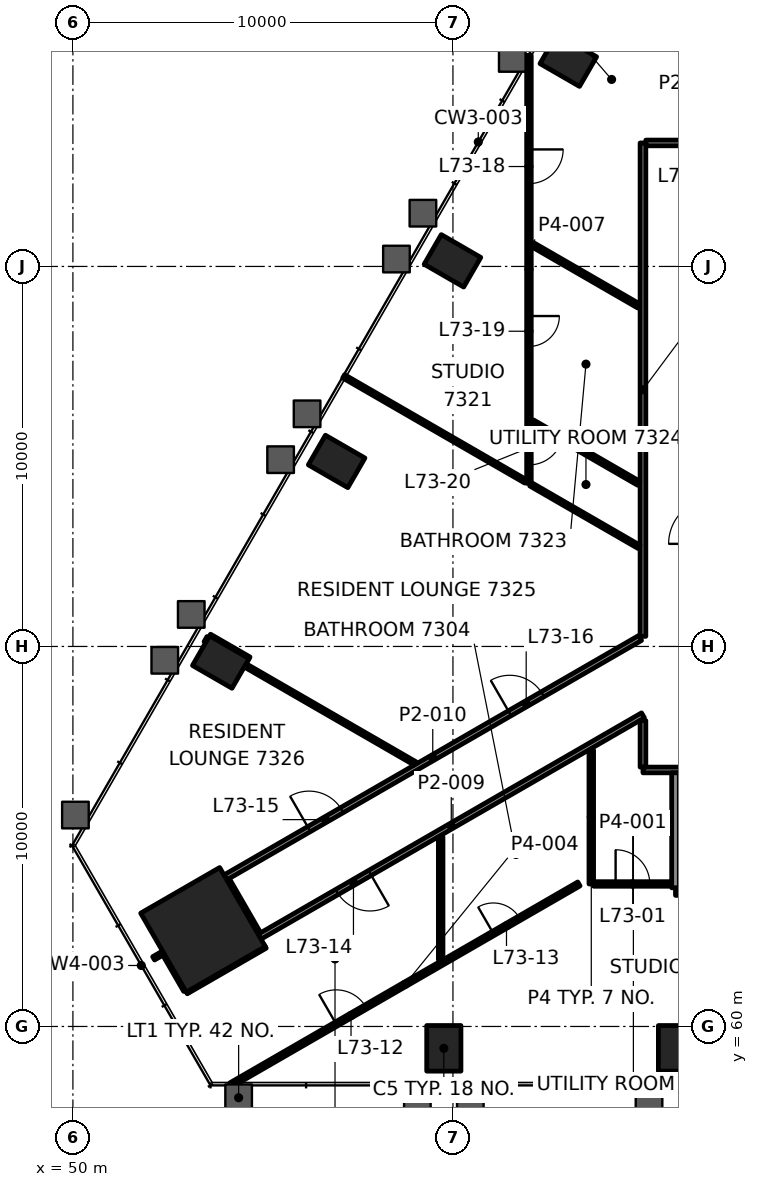
"""IFC4 building model, lengths in metres.
Left out: names, types, materials, properties, quantities, classifications, styles, units other than length and angle.
Written with IfcOpenShell. Run it as: python <this file> out.ifc"""

import sys

from ifc_helpers import new_model, si_unit, direction, frame, frame_2d, origin, origin_2d, place, context, subcontext, project, spatial, rectangle, hollow_rectangle, extrude, element, fill, save


model = new_model("IFC4")
c1 = context("Model", 3, precision=1e-05, world=origin(), true_north=direction((0.0, 1.0)))
c2 = subcontext(c1, "Body", "Model", "MODEL_VIEW")
j1 = project(units=[si_unit("LENGTHUNIT", "METRE"), si_unit("PLANEANGLEUNIT", "RADIAN")], contexts=[c1])
p1 = place(None, origin())
s1 = spatial("IfcSite", under=j1, at=p1, CompositionType="ELEMENT")
p2 = place(p1, origin())
s2 = spatial("IfcBuilding", under=s1, at=p2, CompositionType="ELEMENT")
p3 = place(p2, frame((0.0, 0.0, 302.1)))
s3 = spatial("IfcBuildingStorey", under=s2, at=p3, CompositionType="ELEMENT", Elevation=302.1)
p4 = place(p3, frame((53.423, 62.542, 0.0), z_axis=(0.0, 0.0, 1.0), x_axis=(0.5, -0.866025403784, 0.0)))
e1 = element("IfcColumn", 1, at=p4, inside=s3, PredefinedType="COLUMN", context=c2, shape_type="SweptSolid", body=[
    extrude(rectangle(XDim=2.4, YDim=2.4, at=origin_2d()), origin(), (0.0, 0.0, 1.0), 3.5),
])
for number, where, z_axis, x_axis in (
    (2, (59.76, 59.425, -0.0), (0.0, 0.0, 1.0), (1.0, 0.0, 0.0)),
    (3, (65.856, 59.425, -0.0), (0.0, 0.0, 1.0), (1.0, 0.0, 0.0)),
    (4, (63.035, 85.427, -0.0), (0.0, 0.0, 1.0), (-0.5, -0.866, 0.0)),
    (5, (59.987, 80.148, -0.0), (0.0, 0.0, 1.0), (-0.5, -0.866, 0.0)),
    (6, (56.939, 74.869, -0.0), (0.0, 0.0, 1.0), (-0.5, -0.866, 0.0)),
    (7, (53.891, 69.589, -0.0), (0.0, 0.0, 1.0), (-0.5, -0.866, 0.0)),
):
    element("IfcColumn", number, at=place(p3, frame(where, z_axis=z_axis, x_axis=x_axis)), inside=s3, PredefinedType="COLUMN", context=c2, shape_type="SweptSolid", body=[
        extrude(hollow_rectangle(XDim=0.9, YDim=1.2, WallThickness=0.06, at=origin_2d()), origin(), (0.0, 0.0, 1.0), 3.5),
    ])
p5 = place(p3, frame((65.856, 63.55, 0.0), z_axis=(0.0, 0.0, 1.0), x_axis=(1.0, 0.0, 0.0)))
e8 = element("IfcWall", 8, at=p5, inside=s3, PredefinedType="PARTITIONING", context=c2, shape_type="SweptSolid", body=[
    extrude(rectangle(XDim=8.128, YDim=0.2, at=frame_2d((4.064, 0.0))), origin(), (0.0, 0.0, 1.0), 2.7),
])
p6 = place(p3, frame((63.704, 63.75, 0.0), z_axis=(0.0, 0.0, 1.0), x_axis=(1.0, 0.0, 0.0)))
e9 = element("IfcWall", 9, at=p6, inside=s3, PredefinedType="PARTITIONING", context=c2, shape_type="SweptSolid", body=[
    extrude(rectangle(XDim=2.052, YDim=0.12, at=frame_2d((1.026, 0.0))), origin(), (0.0, 0.0, 1.0), 2.7),
])
p7 = place(p6, frame((0.576, 0.0, 0.0)))
e10 = element("IfcOpeningElement", 10, at=p7, cuts=e9, PredefinedType="OPENING", context=c2, shape_type="SweptSolid", body=[
    extrude(rectangle(XDim=0.9, YDim=2.1, at=frame_2d((0.45, 1.05))), frame((0.0, 0.07, 0.0), z_axis=(0.0, -1.0, 0.0), x_axis=(1.0, 0.0, 0.0)), (0.0, 0.0, 1.0), 0.14),
])
p8 = place(p3, frame((85.0, 66.75, 0.0), z_axis=(0.0, 0.0, 1.0), x_axis=(-1.0, 0.0, 0.0)))
e11 = element("IfcWall", 11, at=p8, inside=s3, PredefinedType="PARTITIONING", context=c2, shape_type="SweptSolid", body=[
    extrude(rectangle(XDim=20.0, YDim=0.15, at=frame_2d((10.0, 0.0))), origin(), (0.0, 0.0, 1.0), 2.7),
])
p9 = place(p8, frame((5.486, 0.0, 0.0)))
e12 = element("IfcOpeningElement", 12, at=p9, cuts=e11, PredefinedType="OPENING", context=c2, shape_type="SweptSolid", body=[
    extrude(rectangle(XDim=0.9, YDim=2.1, at=frame_2d((0.45, 1.05))), frame((0.0, 0.085, 0.0), z_axis=(0.0, -1.0, 0.0), x_axis=(1.0, 0.0, 0.0)), (0.0, 0.0, 1.0), 0.17),
])
p10 = place(p8, frame((11.582, 0.0, 0.0)))
e13 = element("IfcOpeningElement", 13, at=p10, cuts=e11, PredefinedType="OPENING", context=c2, shape_type="SweptSolid", body=[
    extrude(rectangle(XDim=0.9, YDim=2.1, at=frame_2d((0.45, 1.05))), frame((0.0, 0.085, 0.0), z_axis=(0.0, -1.0, 0.0), x_axis=(1.0, 0.0, 0.0)), (0.0, 0.0, 1.0), 0.17),
])
p11 = place(p8, frame((13.614, 0.0, 0.0)))
e14 = element("IfcOpeningElement", 14, at=p11, cuts=e11, PredefinedType="OPENING", context=c2, shape_type="SweptSolid", body=[
    extrude(rectangle(XDim=0.9, YDim=2.1, at=frame_2d((0.45, 1.05))), frame((0.0, 0.085, 0.0), z_axis=(0.0, -1.0, 0.0), x_axis=(1.0, 0.0, 0.0)), (0.0, 0.0, 1.0), 0.17),
])
p12 = place(p8, frame((15.646, 0.0, 0.0)))
e15 = element("IfcOpeningElement", 15, at=p12, cuts=e11, PredefinedType="OPENING", context=c2, shape_type="SweptSolid", body=[
    extrude(rectangle(XDim=0.9, YDim=2.1, at=frame_2d((0.45, 1.05))), frame((0.0, 0.085, 0.0), z_axis=(0.0, -1.0, 0.0), x_axis=(1.0, 0.0, 0.0)), (0.0, 0.0, 1.0), 0.17),
])
p13 = place(p8, frame((17.678, 0.0, 0.0)))
e16 = element("IfcOpeningElement", 16, at=p13, cuts=e11, PredefinedType="OPENING", context=c2, shape_type="SweptSolid", body=[
    extrude(rectangle(XDim=0.9, YDim=2.1, at=frame_2d((0.45, 1.05))), frame((0.0, 0.085, 0.0), z_axis=(0.0, -1.0, 0.0), x_axis=(1.0, 0.0, 0.0)), (0.0, 0.0, 1.0), 0.17),
])
p14 = place(p3, frame((65.075, 83.25, 0.0), z_axis=(0.0, 0.0, 1.0), x_axis=(1.0, 0.0, 0.0)))
e17 = element("IfcWall", 17, at=p14, inside=s3, PredefinedType="PARTITIONING", context=c2, shape_type="SweptSolid", body=[
    extrude(rectangle(XDim=5.565, YDim=0.15, at=frame_2d((2.783, 0.0))), origin(), (0.0, 0.0, 1.0), 2.7),
])
p15 = place(p14, frame((2.283, 0.0, 0.0)))
e18 = element("IfcOpeningElement", 18, at=p15, cuts=e17, PredefinedType="OPENING", context=c2, shape_type="SweptSolid", body=[
    extrude(rectangle(XDim=1.0, YDim=2.1, at=frame_2d((0.5, 1.05))), frame((0.0, 0.085, 0.0), z_axis=(0.0, -1.0, 0.0), x_axis=(1.0, 0.0, 0.0)), (0.0, 0.0, 1.0), 0.17),
])
p16 = place(p3, frame((54.16, 58.465, 0.0), z_axis=(0.0, 0.0, 1.0), x_axis=(0.866034434898, 0.499984357326, 0.0)))
e19 = element("IfcWall", 19, at=p16, inside=s3, PredefinedType="PARTITIONING", context=c2, shape_type="SweptSolid", body=[
    extrude(rectangle(XDim=10.571, YDim=0.12, at=frame_2d((5.285, 0.0))), origin(), (0.0, 0.0, 1.0), 2.7),
])
p17 = place(p16, frame((3.197, 0.0, 0.0)))
e20 = element("IfcOpeningElement", 20, at=p17, cuts=e19, PredefinedType="OPENING", context=c2, shape_type="SweptSolid", body=[
    extrude(rectangle(XDim=0.9, YDim=2.1, at=frame_2d((0.45, 1.05))), frame((0.0, 0.07, 0.0), z_axis=(0.0, -1.0, 0.0), x_axis=(1.0, 0.0, 0.0)), (0.0, 0.0, 1.0), 0.14),
])
p18 = place(p16, frame((7.97, 0.0, 0.0)))
e21 = element("IfcOpeningElement", 21, at=p18, cuts=e19, PredefinedType="OPENING", context=c2, shape_type="SweptSolid", body=[
    extrude(rectangle(XDim=0.8, YDim=2.1, at=frame_2d((0.4, 1.05))), frame((0.0, 0.07, 0.0), z_axis=(0.0, -1.0, 0.0), x_axis=(1.0, 0.0, 0.0)), (0.0, 0.0, 1.0), 0.14),
])
p19 = place(p3, frame((52.984, 60.904, 0.0), z_axis=(0.0, 0.0, 1.0), x_axis=(0.866011011868, 0.500024926702, 0.0)))
e22 = element("IfcWall", 22, at=p19, inside=s3, PredefinedType="PARTITIONING", context=c2, shape_type="SweptSolid", body=[
    extrude(rectangle(XDim=2.399, YDim=0.1, at=frame_2d((1.199, 0.0))), origin(), (0.0, 0.0, 1.0), 2.7),
])
p20 = place(p3, frame((65.0, 68.187, 0.0), z_axis=(0.0, 0.0, 1.0), x_axis=(-0.866026430432, -0.49999822179, 0.0)))
e23 = element("IfcWall", 23, at=p20, inside=s3, PredefinedType="PARTITIONING", context=c2, shape_type="SweptSolid", body=[
    extrude(rectangle(XDim=11.648, YDim=0.15, at=frame_2d((5.824, 0.0))), origin(), (0.0, 0.0, 1.0), 2.547),
])
p21 = place(p20, frame((8.296, 0.0, 0.0)))
e24 = element("IfcOpeningElement", 24, at=p21, cuts=e23, PredefinedType="OPENING", context=c2, shape_type="SweptSolid", body=[
    extrude(rectangle(XDim=1.0, YDim=2.1, at=frame_2d((0.5, 1.05))), frame((0.0, 0.085, 0.0), z_axis=(0.0, -1.0, 0.0), x_axis=(1.0, 0.0, 0.0)), (0.0, 0.0, 1.0), 0.17),
])
p22 = place(p3, frame((52.124, 61.792, 0.0), z_axis=(0.0, 0.0, 1.0), x_axis=(0.866006330792, 0.500033033937, 0.0)))
e25 = element("IfcWall", 25, at=p22, inside=s3, PredefinedType="PARTITIONING", context=c2, shape_type="SweptSolid", body=[
    extrude(rectangle(XDim=0.25, YDim=0.1, at=frame_2d((0.125, 0.0))), origin(), (0.0, 0.0, 1.0), 2.7),
])
p23 = place(p3, frame((54.012, 63.922, 0.0), z_axis=(0.0, 0.0, 1.0), x_axis=(0.866028779199, 0.499994153564, 0.0)))
e26 = element("IfcWall", 26, at=p23, inside=s3, PredefinedType="PARTITIONING", context=c2, shape_type="SweptSolid", body=[
    extrude(rectangle(XDim=12.601, YDim=0.15, at=frame_2d((6.3, 0.0))), origin(), (0.0, 0.0, 1.0), 2.7),
])
p24 = place(p23, frame((2.542, 0.0, 0.0)))
e27 = element("IfcOpeningElement", 27, at=p24, cuts=e26, PredefinedType="OPENING", context=c2, shape_type="SweptSolid", body=[
    extrude(rectangle(XDim=1.0, YDim=2.1, at=frame_2d((0.5, 1.05))), frame((0.0, 0.085, 0.0), z_axis=(0.0, -1.0, 0.0), x_axis=(1.0, 0.0, 0.0)), (0.0, 0.0, 1.0), 0.17),
])
p25 = place(p23, frame((8.639, 0.0, 0.0)))
e28 = element("IfcOpeningElement", 28, at=p25, cuts=e26, PredefinedType="OPENING", context=c2, shape_type="SweptSolid", body=[
    extrude(rectangle(XDim=1.0, YDim=2.1, at=frame_2d((0.5, 1.05))), frame((0.0, 0.085, 0.0), z_axis=(0.0, -1.0, 0.0), x_axis=(1.0, 0.0, 0.0)), (0.0, 0.0, 1.0), 0.17),
])
p26 = place(p3, frame((53.495, 70.102, 0.0), z_axis=(0.0, 0.0, 1.0), x_axis=(0.499906209203, 0.866079547155, 0.0)))
e29 = element("IfcWall", 29, at=p26, inside=s3, PredefinedType="PARTITIONING", context=c2, shape_type="SweptSolid", body=[
    extrude(rectangle(XDim=0.153, YDim=0.1, at=frame_2d((0.077, 0.0))), origin(), (0.0, 0.0, 1.0), 2.7),
])
p27 = place(p3, frame((65.856, 63.65, 0.0), z_axis=(0.0, 0.0, 1.0), x_axis=(0.0, 1.0, 0.0)))
e30 = element("IfcWall", 30, at=p27, inside=s3, PredefinedType="PARTITIONING", context=c2, shape_type="SweptSolid", body=[
    extrude(rectangle(XDim=3.025, YDim=0.2, at=frame_2d((1.513, 0.0))), origin(), (0.0, 0.0, 1.0), 2.7),
])
p28 = place(p3, frame((65.0, 66.825, 0.0), z_axis=(0.0, 0.0, 1.0), x_axis=(0.0, 1.0, 0.0)))
e31 = element("IfcWall", 31, at=p28, inside=s3, PredefinedType="PARTITIONING", context=c2, shape_type="SweptSolid", body=[
    extrude(rectangle(XDim=1.226, YDim=0.15, at=frame_2d((0.613, 0.0))), origin(), (0.0, 0.0, 1.0), 2.547),
])
p29 = place(p3, frame((65.0, 70.266, 0.0), z_axis=(0.0, 0.0, 1.0), x_axis=(0.0, 1.0, 0.0)))
e32 = element("IfcWall", 32, at=p29, inside=s3, PredefinedType="PARTITIONING", context=c2, shape_type="SweptSolid", body=[
    extrude(rectangle(XDim=12.984, YDim=0.15, at=frame_2d((6.492, 0.0))), origin(), (0.0, 0.0, 1.0), 2.7),
])
p30 = place(p3, frame((63.64, 63.75, 0.0), z_axis=(0.0, 0.0, 1.0), x_axis=(0.0, 1.0, 0.0)))
e33 = element("IfcWall", 33, at=p30, inside=s3, PredefinedType="PARTITIONING", context=c2, shape_type="SweptSolid", body=[
    extrude(rectangle(XDim=3.525, YDim=0.12, at=frame_2d((1.763, 0.0))), origin(), (0.0, 0.0, 1.0), 2.547),
])
p31 = place(p3, frame((62.0, 85.554, 0.0), z_axis=(0.0, 0.0, 1.0), x_axis=(0.0, -1.0, 0.0)))
e34 = element("IfcWall", 34, at=p31, inside=s3, PredefinedType="PARTITIONING", context=c2, shape_type="SweptSolid", body=[
    extrude(rectangle(XDim=11.261, YDim=0.12, at=frame_2d((5.63, 0.0))), origin(), (0.0, 0.0, 1.0), 2.688),
])
p32 = place(p31, frame((2.474, 0.0, 0.0)))
e35 = element("IfcOpeningElement", 35, at=p32, cuts=e34, PredefinedType="OPENING", context=c2, shape_type="SweptSolid", body=[
    extrude(rectangle(XDim=0.9, YDim=2.1, at=frame_2d((0.45, 1.05))), frame((0.0, 0.07, 0.0), z_axis=(0.0, -1.0, 0.0), x_axis=(1.0, 0.0, 0.0)), (0.0, 0.0, 1.0), 0.14),
])
p33 = place(p31, frame((6.859, 0.0, 0.0)))
e36 = element("IfcOpeningElement", 36, at=p33, cuts=e34, PredefinedType="OPENING", context=c2, shape_type="SweptSolid", body=[
    extrude(rectangle(XDim=0.8, YDim=2.1, at=frame_2d((0.4, 1.05))), frame((0.0, 0.07, 0.0), z_axis=(0.0, -1.0, 0.0), x_axis=(1.0, 0.0, 0.0)), (0.0, 0.0, 1.0), 0.14),
])
p34 = place(p31, frame((9.876, 0.0, 0.0)))
e37 = element("IfcOpeningElement", 37, at=p34, cuts=e34, PredefinedType="OPENING", context=c2, shape_type="SweptSolid", body=[
    extrude(rectangle(XDim=0.9, YDim=2.1, at=frame_2d((0.45, 1.05))), frame((0.0, 0.07, 0.0), z_axis=(0.0, -1.0, 0.0), x_axis=(1.0, 0.0, 0.0)), (0.0, 0.0, 1.0), 0.14),
])
p35 = place(p3, frame((59.677, 61.759, 0.0), z_axis=(0.0, 0.0, 1.0), x_axis=(0.0, 1.0, 0.0)))
e38 = element("IfcWall", 38, at=p35, inside=s3, PredefinedType="PARTITIONING", context=c2, shape_type="SweptSolid", body=[
    extrude(rectangle(XDim=3.228, YDim=0.12, at=frame_2d((1.614, 0.0))), origin(), (0.0, 0.0, 1.0), 2.7),
])
p36 = place(p3, frame((54.872, 62.433, 0.0), z_axis=(0.0, 0.0, 1.0), x_axis=(-0.499988108725, 0.866032269107, 0.0)))
e39 = element("IfcWall", 39, at=p36, inside=s3, PredefinedType="PARTITIONING", context=c2, shape_type="SweptSolid", body=[
    extrude(rectangle(XDim=1.644, YDim=0.15, at=frame_2d((0.822, 0.0))), origin(), (0.0, 0.0, 1.0), 2.547),
])
p37 = place(p3, frame((52.958, 60.947, 0.0), z_axis=(0.0, 0.0, 1.0), x_axis=(-0.499955427682, 0.866051136095, 0.0)))
e40 = element("IfcWall", 40, at=p37, inside=s3, PredefinedType="PARTITIONING", context=c2, shape_type="SweptSolid", body=[
    extrude(rectangle(XDim=1.149, YDim=0.1, at=frame_2d((0.574, 0.0))), origin(), (0.0, 0.0, 1.0), 2.7),
])
p38 = place(p3, frame((70.871, 83.25, 0.0), z_axis=(0.0, 0.0, 1.0), x_axis=(-0.866018527528, 0.500011909837, 0.0)))
e41 = element("IfcWall", 41, at=p38, inside=s3, PredefinedType="PARTITIONING", context=c2, shape_type="SweptSolid", body=[
    extrude(rectangle(XDim=8.834, YDim=0.1, at=frame_2d((4.417, 0.0))), origin(), (0.0, 0.0, 1.0), 2.688),
])
for number, where, z_axis, x_axis in (
    (42, (64.89, 78.959, 0.0), (0.0, 0.0, 1.0), (-0.866, 0.5, 0.0)),
    (43, (64.89, 74.293, 0.0), (0.0, 0.0, 1.0), (-0.866, 0.5, 0.0)),
):
    element("IfcWall", number, at=place(p3, frame(where, z_axis=z_axis, x_axis=x_axis)), inside=s3, PredefinedType="PARTITIONING", context=c2, shape_type="SweptSolid", body=[
        extrude(rectangle(XDim=3.228, YDim=0.12, at=frame_2d((1.614, 0.0))), origin(), (0.0, 0.0, 1.0), 2.7),
    ])
p39 = place(p3, frame((64.899, 72.62, 0.0), z_axis=(0.0, 0.0, 1.0), x_axis=(-0.866032610133, 0.499987518031, 0.0)))
e44 = element("IfcWall", 44, at=p39, inside=s3, PredefinedType="PARTITIONING", context=c2, shape_type="SweptSolid", body=[
    extrude(rectangle(XDim=3.295, YDim=0.1, at=frame_2d((1.648, 0.0))), origin(), (0.0, 0.0, 1.0), 2.7),
])
p40 = place(p3, frame((54.636, 69.679, 0.0), z_axis=(0.0, 0.0, 1.0), x_axis=(-0.865978732077, 0.500080829057, 0.0)))
e45 = element("IfcWall", 45, at=p40, inside=s3, PredefinedType="PARTITIONING", context=c2, shape_type="SweptSolid", body=[
    extrude(rectangle(XDim=1.199, YDim=0.1, at=frame_2d((0.6, 0.0))), origin(), (0.0, 0.0, 1.0), 2.7),
])
p41 = place(p3, frame((59.005, 66.921, 0.0), z_axis=(0.0, 0.0, 1.0), x_axis=(-0.866022552607, 0.500004938352, 0.0)))
e46 = element("IfcWall", 46, at=p41, inside=s3, PredefinedType="PARTITIONING", context=c2, shape_type="SweptSolid", body=[
    extrude(rectangle(XDim=5.162, YDim=0.1, at=frame_2d((2.581, 0.0))), origin(), (0.0, 0.0, 1.0), 2.7),
])
p42 = place(p3, frame((61.915, 74.343, 0.0), z_axis=(0.0, 0.0, 1.0), x_axis=(-0.866023907196, 0.500002592159, 0.0)))
e47 = element("IfcWall", 47, at=p42, inside=s3, PredefinedType="PARTITIONING", context=c2, shape_type="SweptSolid", body=[
    extrude(rectangle(XDim=5.532, YDim=0.1, at=frame_2d((2.766, 0.0))), origin(), (0.0, 0.0, 1.0), 2.688),
])
p43 = place(p7, origin())
e48 = element("IfcDoor", 48, at=p43, inside=s3, OperationType="SINGLE_SWING_LEFT", PredefinedType="DOOR", context=c2, shape_type="SweptSolid", body=[
    extrude(rectangle(XDim=0.9, YDim=2.1, at=frame_2d((0.45, 1.05))), frame((0.0, 0.025, 0.0), z_axis=(0.0, -1.0, 0.0), x_axis=(1.0, 0.0, 0.0)), (0.0, 0.0, 1.0), 0.05),
])
fill(e10, e48)
p44 = place(p17, origin())
e49 = element("IfcDoor", 49, at=p44, inside=s3, OperationType="SINGLE_SWING_RIGHT", PredefinedType="DOOR", context=c2, shape_type="SweptSolid", body=[
    extrude(rectangle(XDim=0.9, YDim=2.1, at=frame_2d((0.45, 1.05))), frame((0.0, 0.025, 0.0), z_axis=(0.0, -1.0, 0.0), x_axis=(1.0, 0.0, 0.0)), (0.0, 0.0, 1.0), 0.05),
])
fill(e20, e49)
p45 = place(p18, origin())
e50 = element("IfcDoor", 50, at=p45, inside=s3, OperationType="SINGLE_SWING_RIGHT", PredefinedType="DOOR", context=c2, shape_type="SweptSolid", body=[
    extrude(rectangle(XDim=0.8, YDim=2.1, at=frame_2d((0.4, 1.05))), frame((0.0, 0.025, 0.0), z_axis=(0.0, -1.0, 0.0), x_axis=(1.0, 0.0, 0.0)), (0.0, 0.0, 1.0), 0.05),
])
fill(e21, e50)
p46 = place(p21, origin())
e51 = element("IfcDoor", 51, at=p46, inside=s3, OperationType="SINGLE_SWING_RIGHT", PredefinedType="DOOR", context=c2, shape_type="SweptSolid", body=[
    extrude(rectangle(XDim=1.0, YDim=2.1, at=frame_2d((0.5, 1.05))), frame((0.0, 0.025, 0.0), z_axis=(0.0, -1.0, 0.0), x_axis=(1.0, 0.0, 0.0)), (0.0, 0.0, 1.0), 0.05),
])
fill(e24, e51)
p47 = place(p24, origin())
e52 = element("IfcDoor", 52, at=p47, inside=s3, OperationType="SINGLE_SWING_LEFT", PredefinedType="DOOR", context=c2, shape_type="SweptSolid", body=[
    extrude(rectangle(XDim=1.0, YDim=2.1, at=frame_2d((0.5, 1.05))), frame((0.0, 0.025, 0.0), z_axis=(0.0, -1.0, 0.0), x_axis=(1.0, 0.0, 0.0)), (0.0, 0.0, 1.0), 0.05),
])
fill(e27, e52)
p48 = place(p25, origin())
e53 = element("IfcDoor", 53, at=p48, inside=s3, OperationType="SINGLE_SWING_RIGHT", PredefinedType="DOOR", context=c2, shape_type="SweptSolid", body=[
    extrude(rectangle(XDim=1.0, YDim=2.1, at=frame_2d((0.5, 1.05))), frame((0.0, 0.025, 0.0), z_axis=(0.0, -1.0, 0.0), x_axis=(1.0, 0.0, 0.0)), (0.0, 0.0, 1.0), 0.05),
])
fill(e28, e53)
p49 = place(p32, origin())
e54 = element("IfcDoor", 54, at=p49, inside=s3, OperationType="SINGLE_SWING_RIGHT", PredefinedType="DOOR", context=c2, shape_type="SweptSolid", body=[
    extrude(rectangle(XDim=0.9, YDim=2.1, at=frame_2d((0.45, 1.05))), frame((0.0, 0.025, 0.0), z_axis=(0.0, -1.0, 0.0), x_axis=(1.0, 0.0, 0.0)), (0.0, 0.0, 1.0), 0.05),
])
fill(e35, e54)
p50 = place(p33, origin())
e55 = element("IfcDoor", 55, at=p50, inside=s3, OperationType="SINGLE_SWING_RIGHT", PredefinedType="DOOR", context=c2, shape_type="SweptSolid", body=[
    extrude(rectangle(XDim=0.8, YDim=2.1, at=frame_2d((0.4, 1.05))), frame((0.0, 0.025, 0.0), z_axis=(0.0, -1.0, 0.0), x_axis=(1.0, 0.0, 0.0)), (0.0, 0.0, 1.0), 0.05),
])
fill(e36, e55)
p51 = place(p34, origin())
e56 = element("IfcDoor", 56, at=p51, inside=s3, OperationType="SINGLE_SWING_LEFT", PredefinedType="DOOR", context=c2, shape_type="SweptSolid", body=[
    extrude(rectangle(XDim=0.9, YDim=2.1, at=frame_2d((0.45, 1.05))), frame((0.0, 0.025, 0.0), z_axis=(0.0, -1.0, 0.0), x_axis=(1.0, 0.0, 0.0)), (0.0, 0.0, 1.0), 0.05),
])
fill(e37, e56)
save(model, sys.argv[1])
